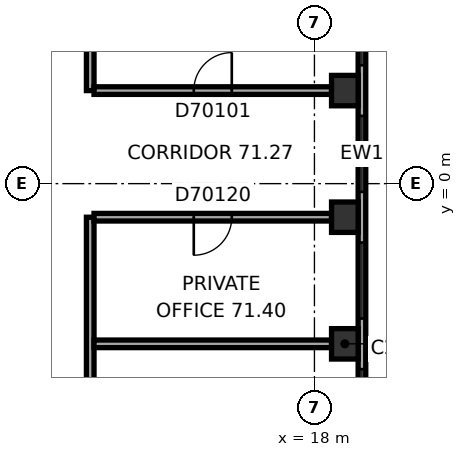
"""IFC4 building model, lengths in metres.
Left out: names, types, materials, properties, quantities, classifications, styles, units other than length and angle.
Written with IfcOpenShell. Run it as: python <this file> out.ifc"""

import sys

from ifc_helpers import new_model, si_unit, direction, frame, frame_2d, origin, origin_2d, place, context, subcontext, project, spatial, rectangle, extrude, element, fill, save


model = new_model("IFC4")
c1 = context("Model", 3, precision=1e-05, world=origin(), true_north=direction((0.0, 1.0)))
c2 = subcontext(c1, "Body", "Model", "MODEL_VIEW")
j1 = project(units=[si_unit("LENGTHUNIT", "METRE"), si_unit("PLANEANGLEUNIT", "RADIAN")], contexts=[c1])
p1 = place(None, origin())
s1 = spatial("IfcSite", under=j1, at=p1, CompositionType="ELEMENT")
p2 = place(p1, origin())
s2 = spatial("IfcBuilding", under=s1, at=p2, CompositionType="ELEMENT")
p3 = place(p2, frame((0.0, 0.0, 289.4)))
s3 = spatial("IfcBuildingStorey", under=s2, at=p3, CompositionType="ELEMENT", Elevation=289.4)
for number, where, z_axis, x_axis in (
    (1, (18.8, -4.215, 0.0), (0.0, 0.0, 1.0), (0.0, 1.0, 0.0)),
    (2, (18.8, -0.883, 0.0), (0.0, 0.0, 1.0), (0.0, 1.0, 0.0)),
    (3, (18.8, 2.448, 0.0), (0.0, 0.0, 1.0), (0.0, 1.0, 0.0)),
):
    element("IfcColumn", number, at=place(p3, frame(where, z_axis=z_axis, x_axis=x_axis)), inside=s3, PredefinedType="COLUMN", context=c2, shape_type="SweptSolid", body=[
        extrude(rectangle(XDim=0.8, YDim=0.7, at=origin_2d()), origin(), (0.0, 0.0, 1.0), 3.7),
    ])
p4 = place(p3, frame((19.25, -8.084, 0.0), z_axis=(0.0, 0.0, 1.0), x_axis=(0.0, 1.0, 0.0)))
e4 = element("IfcWall", 4, at=p4, inside=s3, PredefinedType="STANDARD", context=c2, shape_type="SweptSolid", body=[
    extrude(rectangle(XDim=17.731, YDim=0.2, at=frame_2d((8.866, 0.0))), origin(), (0.0, 0.0, 1.0), 3.7),
])
p5 = place(p4, frame((1.203, 0.0, 0.9)))
e5 = element("IfcOpeningElement", 5, at=p5, cuts=e4, PredefinedType="OPENING", context=c2, shape_type="SweptSolid", body=[
    extrude(rectangle(XDim=2.0, YDim=2.0, at=frame_2d((1.0, 1.0))), frame((0.0, 0.11, 0.0), z_axis=(0.0, -1.0, 0.0), x_axis=(1.0, 0.0, 0.0)), (0.0, 0.0, 1.0), 0.22),
])
p6 = place(p4, frame((4.535, 0.0, 0.9)))
e6 = element("IfcOpeningElement", 6, at=p6, cuts=e4, PredefinedType="OPENING", context=c2, shape_type="SweptSolid", body=[
    extrude(rectangle(XDim=2.0, YDim=2.0, at=frame_2d((1.0, 1.0))), frame((0.0, 0.11, 0.0), z_axis=(0.0, -1.0, 0.0), x_axis=(1.0, 0.0, 0.0)), (0.0, 0.0, 1.0), 0.22),
])
p7 = place(p4, frame((7.866, 0.0, 0.9)))
e7 = element("IfcOpeningElement", 7, at=p7, cuts=e4, PredefinedType="OPENING", context=c2, shape_type="SweptSolid", body=[
    extrude(rectangle(XDim=2.0, YDim=2.0, at=frame_2d((1.0, 1.0))), frame((0.0, 0.11, 0.0), z_axis=(0.0, -1.0, 0.0), x_axis=(1.0, 0.0, 0.0)), (0.0, 0.0, 1.0), 0.22),
])
p8 = place(p4, frame((11.198, 0.0, 0.9)))
e8 = element("IfcOpeningElement", 8, at=p8, cuts=e4, PredefinedType="OPENING", context=c2, shape_type="SweptSolid", body=[
    extrude(rectangle(XDim=2.0, YDim=2.0, at=frame_2d((1.0, 1.0))), frame((0.0, 0.11, 0.0), z_axis=(0.0, -1.0, 0.0), x_axis=(1.0, 0.0, 0.0)), (0.0, 0.0, 1.0), 0.22),
])
p9 = place(p4, frame((14.53, 0.0, 0.9)))
e9 = element("IfcOpeningElement", 9, at=p9, cuts=e4, PredefinedType="OPENING", context=c2, shape_type="SweptSolid", body=[
    extrude(rectangle(XDim=2.0, YDim=2.0, at=frame_2d((1.0, 1.0))), frame((0.0, 0.11, 0.0), z_axis=(0.0, -1.0, 0.0), x_axis=(1.0, 0.0, 0.0)), (0.0, 0.0, 1.0), 0.22),
])
p10 = place(p3, frame((12.1, -5.849, 0.0), z_axis=(0.0, 0.0, 1.0), x_axis=(0.0, 1.0, 0.0)))
e10 = element("IfcWall", 10, at=p10, inside=s3, PredefinedType="PARTITIONING", context=c2, shape_type="SweptSolid", body=[
    extrude(rectangle(XDim=4.966, YDim=0.2, at=frame_2d((2.483, 0.0))), origin(), (0.0, 0.0, 1.0), 3.42),
])
p11 = place(p3, frame((12.1, 2.448, 0.0), z_axis=(0.0, 0.0, 1.0), x_axis=(0.0, 1.0, 0.0)))
e11 = element("IfcWall", 11, at=p11, inside=s3, PredefinedType="PARTITIONING", context=c2, shape_type="SweptSolid", body=[
    extrude(rectangle(XDim=3.441, YDim=0.2, at=frame_2d((1.72, 0.0))), origin(), (0.0, 0.0, 1.0), 3.42),
])
p12 = place(p3, frame((12.2, -0.883, 0.0), z_axis=(0.0, 0.0, 1.0), x_axis=(1.0, 0.0, 0.0)))
e12 = element("IfcWall", 12, at=p12, inside=s3, PredefinedType="PARTITIONING", context=c2, shape_type="SweptSolid", body=[
    extrude(rectangle(XDim=6.25, YDim=0.2, at=frame_2d((3.125, 0.0))), origin(), (0.0, 0.0, 1.0), 2.87),
])
p13 = place(p12, frame((2.625, 0.0, 0.0)))
e13 = element("IfcOpeningElement", 13, at=p13, cuts=e12, PredefinedType="OPENING", context=c2, shape_type="SweptSolid", body=[
    extrude(rectangle(XDim=1.0, YDim=2.1, at=frame_2d((0.5, 1.05))), frame((0.0, 0.11, 0.0), z_axis=(0.0, -1.0, 0.0), x_axis=(1.0, 0.0, 0.0)), (0.0, 0.0, 1.0), 0.22),
])
p14 = place(p3, frame((18.45, -4.215, 0.0), z_axis=(0.0, 0.0, 1.0), x_axis=(-1.0, 0.0, 0.0)))
e14 = element("IfcWall", 14, at=p14, inside=s3, PredefinedType="PARTITIONING", context=c2, shape_type="SweptSolid", body=[
    extrude(rectangle(XDim=6.25, YDim=0.2, at=frame_2d((3.125, 0.0))), origin(), (0.0, 0.0, 1.0), 3.42),
])
p15 = place(p3, frame((18.45, 2.448, 0.0), z_axis=(0.0, 0.0, 1.0), x_axis=(-1.0, 0.0, 0.0)))
e15 = element("IfcWall", 15, at=p15, inside=s3, PredefinedType="PARTITIONING", context=c2, shape_type="SweptSolid", body=[
    extrude(rectangle(XDim=6.25, YDim=0.2, at=frame_2d((3.125, 0.0))), origin(), (0.0, 0.0, 1.0), 3.42),
])
p16 = place(p15, frame((2.625, 0.0, 0.0)))
e16 = element("IfcOpeningElement", 16, at=p16, cuts=e15, PredefinedType="OPENING", context=c2, shape_type="SweptSolid", body=[
    extrude(rectangle(XDim=1.0, YDim=2.1, at=frame_2d((0.5, 1.05))), frame((0.0, 0.11, 0.0), z_axis=(0.0, -1.0, 0.0), x_axis=(1.0, 0.0, 0.0)), (0.0, 0.0, 1.0), 0.22),
])
p17 = place(p5, origin())
e17 = element("IfcWindow", 17, at=p17, inside=s3, PartitioningType="SINGLE_PANEL", PredefinedType="WINDOW", context=c2, shape_type="SweptSolid", body=[
    extrude(rectangle(XDim=2.0, YDim=2.0, at=frame_2d((1.0, 1.0))), frame((0.0, 0.03, 0.0), z_axis=(0.0, -1.0, 0.0), x_axis=(1.0, 0.0, 0.0)), (0.0, 0.0, 1.0), 0.06),
])
fill(e5, e17)
p18 = place(p6, origin())
e18 = element("IfcWindow", 18, at=p18, inside=s3, PartitioningType="SINGLE_PANEL", PredefinedType="WINDOW", context=c2, shape_type="SweptSolid", body=[
    extrude(rectangle(XDim=2.0, YDim=2.0, at=frame_2d((1.0, 1.0))), frame((0.0, 0.03, 0.0), z_axis=(0.0, -1.0, 0.0), x_axis=(1.0, 0.0, 0.0)), (0.0, 0.0, 1.0), 0.06),
])
fill(e6, e18)
p19 = place(p7, origin())
e19 = element("IfcWindow", 19, at=p19, inside=s3, PartitioningType="SINGLE_PANEL", PredefinedType="WINDOW", context=c2, shape_type="SweptSolid", body=[
    extrude(rectangle(XDim=2.0, YDim=2.0, at=frame_2d((1.0, 1.0))), frame((0.0, 0.03, 0.0), z_axis=(0.0, -1.0, 0.0), x_axis=(1.0, 0.0, 0.0)), (0.0, 0.0, 1.0), 0.06),
])
fill(e7, e19)
p20 = place(p8, origin())
e20 = element("IfcWindow", 20, at=p20, inside=s3, PartitioningType="SINGLE_PANEL", PredefinedType="WINDOW", context=c2, shape_type="SweptSolid", body=[
    extrude(rectangle(XDim=2.0, YDim=2.0, at=frame_2d((1.0, 1.0))), frame((0.0, 0.03, 0.0), z_axis=(0.0, -1.0, 0.0), x_axis=(1.0, 0.0, 0.0)), (0.0, 0.0, 1.0), 0.06),
])
fill(e8, e20)
p21 = place(p16, origin())
e21 = element("IfcDoor", 21, at=p21, inside=s3, OperationType="SINGLE_SWING_LEFT", PredefinedType="DOOR", context=c2, shape_type="SweptSolid", body=[
    extrude(rectangle(XDim=1.0, YDim=2.1, at=frame_2d((0.5, 1.05))), frame((0.0, 0.025, 0.0), z_axis=(0.0, -1.0, 0.0), x_axis=(1.0, 0.0, 0.0)), (0.0, 0.0, 1.0), 0.05),
])
fill(e16, e21)
p22 = place(p13, origin())
e22 = element("IfcDoor", 22, at=p22, inside=s3, OperationType="SINGLE_SWING_LEFT", PredefinedType="DOOR", context=c2, shape_type="SweptSolid", body=[
    extrude(rectangle(XDim=1.0, YDim=2.1, at=frame_2d((0.5, 1.05))), frame((0.0, 0.025, 0.0), z_axis=(0.0, -1.0, 0.0), x_axis=(1.0, 0.0, 0.0)), (0.0, 0.0, 1.0), 0.05),
])
fill(e13, e22)
save(model, sys.argv[1])
